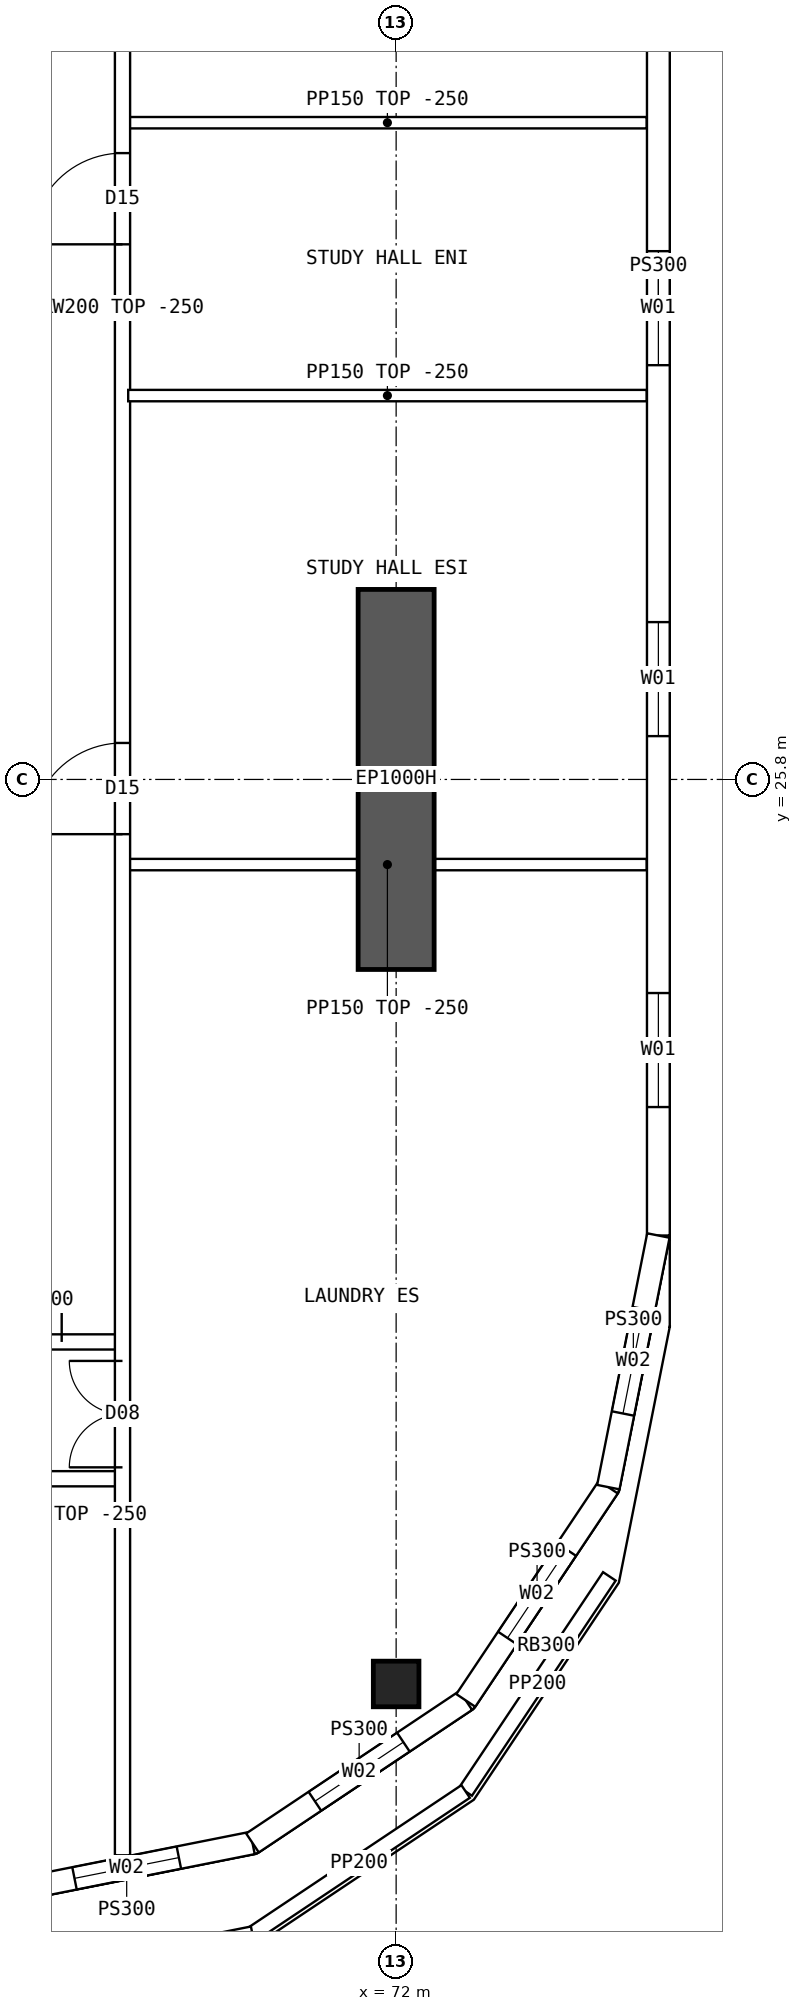
"""IFC4 building model, lengths in metres.
Left out: names, types, materials, properties, quantities, classifications, styles, units other than length and angle.
Written with IfcOpenShell. Run it as: python <this file> out.ifc"""

import sys

from ifc_helpers import new_model, si_unit, direction, frame, frame_2d, origin, origin_2d, place, context, subcontext, project, spatial, polyline, rectangle, hollow_rectangle, outline, extrude, element, fill, save


model = new_model("IFC4")
c1 = context("Model", 3, precision=1e-05, world=origin(), true_north=direction((0.0, 1.0)))
c2 = subcontext(c1, "Body", "Model", "MODEL_VIEW")
j1 = project(units=[si_unit("LENGTHUNIT", "METRE"), si_unit("PLANEANGLEUNIT", "RADIAN")], contexts=[c1])
p1 = place(None, origin())
s1 = spatial("IfcSite", under=j1, at=p1, CompositionType="ELEMENT")
p2 = place(p1, origin())
s2 = spatial("IfcBuilding", under=s1, at=p2, CompositionType="ELEMENT")
p3 = place(p2, frame((0.0, 0.0, 208.3)))
s3 = spatial("IfcBuildingStorey", under=s2, at=p3, CompositionType="ELEMENT", Elevation=208.3)
p4 = place(p3, frame((72.0, 13.9, 0.0), z_axis=(0.0, 0.0, 1.0), x_axis=(1.0, 0.0, 0.0)))
e1 = element("IfcColumn", 1, at=p4, inside=s3, PredefinedType="COLUMN", context=c2, shape_type="SweptSolid", body=[
    extrude(hollow_rectangle(XDim=0.6, YDim=0.6, WallThickness=0.06, at=origin_2d()), origin(), (0.0, 0.0, 1.0), 4.5),
])
p5 = place(p3, frame((72.0, 23.3, 0.0), z_axis=(0.0, 0.0, 1.0), x_axis=(0.0, 1.0, 0.0)))
e2 = element("IfcWall", 2, at=p5, inside=s3, PredefinedType="SHEAR", context=c2, shape_type="SweptSolid", body=[
    extrude(rectangle(XDim=5.0, YDim=1.0, at=frame_2d((2.5, 0.0))), origin(), (0.0, 0.0, 1.0), 4.5),
])
p6 = place(p3, frame((75.45, 19.8, 0.0), z_axis=(0.0, 0.0, 1.0), x_axis=(0.0, 1.0, 0.0)))
e3 = element("IfcWall", 3, at=p6, inside=s3, PredefinedType="SOLIDWALL", context=c2, shape_type="SweptSolid", body=[
    extrude(outline(polyline([(-0.015, -0.15), (24.415, -0.15), (24.385, 0.15), (0.015, 0.15), (-0.015, -0.15)])), origin(), (0.0, 0.0, 1.0), 4.25),
])
p7 = place(p6, frame((1.69, 0.0, 0.9)))
e4 = element("IfcOpeningElement", 4, at=p7, cuts=e3, PredefinedType="OPENING", context=c2, shape_type="SweptSolid", body=[
    extrude(rectangle(XDim=1.5, YDim=2.0, at=frame_2d((0.75, 1.0))), frame((0.0, 0.16, 0.0), z_axis=(0.0, -1.0, 0.0), x_axis=(1.0, 0.0, 0.0)), (0.0, 0.0, 1.0), 0.32),
])
p8 = place(p6, frame((6.57, 0.0, 0.9)))
e5 = element("IfcOpeningElement", 5, at=p8, cuts=e3, PredefinedType="OPENING", context=c2, shape_type="SweptSolid", body=[
    extrude(rectangle(XDim=1.5, YDim=2.0, at=frame_2d((0.75, 1.0))), frame((0.0, 0.16, 0.0), z_axis=(0.0, -1.0, 0.0), x_axis=(1.0, 0.0, 0.0)), (0.0, 0.0, 1.0), 0.32),
])
p9 = place(p6, frame((11.45, 0.0, 0.9)))
e6 = element("IfcOpeningElement", 6, at=p9, cuts=e3, PredefinedType="OPENING", context=c2, shape_type="SweptSolid", body=[
    extrude(rectangle(XDim=1.5, YDim=2.0, at=frame_2d((0.75, 1.0))), frame((0.0, 0.16, 0.0), z_axis=(0.0, -1.0, 0.0), x_axis=(1.0, 0.0, 0.0)), (0.0, 0.0, 1.0), 0.32),
])
p10 = place(p6, frame((16.33, 0.0, 0.9)))
e7 = element("IfcOpeningElement", 7, at=p10, cuts=e3, PredefinedType="OPENING", context=c2, shape_type="SweptSolid", body=[
    extrude(rectangle(XDim=1.5, YDim=2.0, at=frame_2d((0.75, 1.0))), frame((0.0, 0.16, 0.0), z_axis=(0.0, -1.0, 0.0), x_axis=(1.0, 0.0, 0.0)), (0.0, 0.0, 1.0), 0.32),
])
p11 = place(p6, frame((21.21, 0.0, 0.9)))
e8 = element("IfcOpeningElement", 8, at=p11, cuts=e3, PredefinedType="OPENING", context=c2, shape_type="SweptSolid", body=[
    extrude(rectangle(XDim=1.5, YDim=2.0, at=frame_2d((0.75, 1.0))), frame((0.0, 0.16, 0.0), z_axis=(0.0, -1.0, 0.0), x_axis=(1.0, 0.0, 0.0)), (0.0, 0.0, 1.0), 0.32),
])
p12 = place(p3, frame((66.8, 11.15, 0.0), z_axis=(0.0, 0.0, 1.0), x_axis=(0.98078325777, 0.195100490205, 0.0)))
e9 = element("IfcWall", 9, at=p12, inside=s3, PredefinedType="SOLIDWALL", context=c2, shape_type="SweptSolid", body=[
    extrude(outline(polyline([(-0.03, -0.15), (3.405, -0.15), (3.345, 0.15), (0.03, 0.15), (-0.03, -0.15)])), origin(), (0.0, 0.0, 1.0), 4.25),
])
p13 = place(p12, frame((0.988, 0.0, 0.9)))
e10 = element("IfcOpeningElement", 10, at=p13, cuts=e9, PredefinedType="OPENING", context=c2, shape_type="SweptSolid", body=[
    extrude(rectangle(XDim=1.4, YDim=1.8, at=frame_2d((0.7, 0.9))), frame((0.0, 0.16, 0.0), z_axis=(0.0, -1.0, 0.0), x_axis=(1.0, 0.0, 0.0)), (0.0, 0.0, 1.0), 0.32),
])
p14 = place(p3, frame((70.11, 11.808, 0.0), z_axis=(0.0, 0.0, 1.0), x_axis=(0.831460037396, 0.555584562613, 0.0)))
e11 = element("IfcWall", 11, at=p14, inside=s3, PredefinedType="SOLIDWALL", context=c2, shape_type="SweptSolid", body=[
    extrude(outline(polyline([(-0.03, -0.15), (3.405, -0.15), (3.345, 0.15), (0.03, 0.15), (-0.03, -0.15)])), origin(), (0.0, 0.0, 1.0), 4.25),
])
p15 = place(p14, frame((0.988, 0.0, 0.9)))
e12 = element("IfcOpeningElement", 12, at=p15, cuts=e11, PredefinedType="OPENING", context=c2, shape_type="SweptSolid", body=[
    extrude(rectangle(XDim=1.4, YDim=1.8, at=frame_2d((0.7, 0.9))), frame((0.0, 0.16, 0.0), z_axis=(0.0, -1.0, 0.0), x_axis=(1.0, 0.0, 0.0)), (0.0, 0.0, 1.0), 0.32),
])
p16 = place(p3, frame((72.917, 13.684, 0.0), z_axis=(0.0, 0.0, 1.0), x_axis=(0.555567969291, 0.831471124873, 0.0)))
e13 = element("IfcWall", 13, at=p16, inside=s3, PredefinedType="SOLIDWALL", context=c2, shape_type="SweptSolid", body=[
    extrude(outline(polyline([(-0.03, -0.15), (3.405, -0.15), (3.345, 0.15), (0.03, 0.15), (-0.03, -0.15)])), origin(), (0.0, 0.0, 1.0), 4.25),
])
p17 = place(p16, frame((0.988, 0.0, 0.9)))
e14 = element("IfcOpeningElement", 14, at=p17, cuts=e13, PredefinedType="OPENING", context=c2, shape_type="SweptSolid", body=[
    extrude(rectangle(XDim=1.4, YDim=1.8, at=frame_2d((0.7, 0.9))), frame((0.0, 0.16, 0.0), z_axis=(0.0, -1.0, 0.0), x_axis=(1.0, 0.0, 0.0)), (0.0, 0.0, 1.0), 0.32),
])
p18 = place(p3, frame((74.792, 16.49, 0.0), z_axis=(0.0, 0.0, 1.0), x_axis=(0.19508664885, 0.980786011034, 0.0)))
e15 = element("IfcWall", 15, at=p18, inside=s3, PredefinedType="SOLIDWALL", context=c2, shape_type="SweptSolid", body=[
    extrude(outline(polyline([(-0.03, -0.15), (3.39, -0.15), (3.36, 0.15), (0.03, 0.15), (-0.03, -0.15)])), origin(), (0.0, 0.0, 1.0), 4.25),
])
p19 = place(p18, frame((0.988, 0.0, 0.9)))
e16 = element("IfcOpeningElement", 16, at=p19, cuts=e15, PredefinedType="OPENING", context=c2, shape_type="SweptSolid", body=[
    extrude(rectangle(XDim=1.4, YDim=1.8, at=frame_2d((0.7, 0.9))), frame((0.0, 0.16, 0.0), z_axis=(0.0, -1.0, 0.0), x_axis=(1.0, 0.0, 0.0)), (0.0, 0.0, 1.0), 0.32),
])
p20 = place(p3, frame((74.805, 15.316, 0.0), z_axis=(0.0, 0.0, 1.0), x_axis=(-0.555593699073, -0.831453932308, 0.0)))
e17 = element("IfcWall", 17, at=p20, inside=s3, PredefinedType="PARAPET", context=c2, shape_type="SweptSolid", body=[
    extrude(rectangle(XDim=3.404, YDim=0.2, at=frame_2d((1.702, 0.0))), origin(), (0.0, 0.0, 1.0), 1.1),
])
p21 = place(p3, frame((72.914, 12.486, 0.0), z_axis=(0.0, 0.0, 1.0), x_axis=(-0.831448637767, -0.555601622348, 0.0)))
e18 = element("IfcWall", 18, at=p21, inside=s3, PredefinedType="PARAPET", context=c2, shape_type="SweptSolid", body=[
    extrude(rectangle(XDim=3.374, YDim=0.2, at=frame_2d((1.687, 0.0))), origin(), (0.0, 0.0, 1.0), 1.1),
])
p22 = place(p3, frame((70.109, 10.611, 0.0), z_axis=(0.0, 0.0, 1.0), x_axis=(-0.980787925163, -0.195077025438, 0.0)))
e19 = element("IfcWall", 19, at=p22, inside=s3, PredefinedType="PARAPET", context=c2, shape_type="SweptSolid", body=[
    extrude(rectangle(XDim=3.389, YDim=0.2, at=frame_2d((1.695, 0.0))), origin(), (0.0, 0.0, 1.0), 1.1),
])
p23 = place(p3, frame((66.35, 16.6, 0.0), z_axis=(0.0, 0.0, 1.0), x_axis=(1.0, 0.0, 0.0)))
e20 = element("IfcWall", 20, at=p23, inside=s3, PredefinedType="SOLIDWALL", context=c2, shape_type="SweptSolid", body=[
    extrude(rectangle(XDim=2.05, YDim=0.2, at=frame_2d((1.025, 0.0))), origin(), (0.0, 0.0, 1.0), 4.25),
])
p24 = place(p23, frame((0.2, 0.0, 0.0)))
e21 = element("IfcOpeningElement", 21, at=p24, cuts=e20, PredefinedType="OPENING", context=c2, shape_type="SweptSolid", body=[
    extrude(rectangle(XDim=0.9, YDim=2.1, at=frame_2d((0.45, 1.05))), frame((0.0, 0.11, 0.0), z_axis=(0.0, -1.0, 0.0), x_axis=(1.0, 0.0, 0.0)), (0.0, 0.0, 1.0), 0.22),
])
p25 = place(p3, frame((66.35, 18.4, 0.0), z_axis=(0.0, 0.0, 1.0), x_axis=(1.0, 0.0, 0.0)))
e22 = element("IfcWall", 22, at=p25, inside=s3, PredefinedType="SOLIDWALL", context=c2, shape_type="SweptSolid", body=[
    extrude(rectangle(XDim=2.05, YDim=0.2, at=frame_2d((1.025, 0.0))), origin(), (0.0, 0.0, 1.0), 4.25),
])
p26 = place(p25, frame((0.05, 0.0, 0.0)))
e23 = element("IfcOpeningElement", 23, at=p26, cuts=e22, PredefinedType="OPENING", context=c2, shape_type="SweptSolid", body=[
    extrude(rectangle(XDim=1.2, YDim=2.1, at=frame_2d((0.6, 1.05))), frame((0.0, 0.11, 0.0), z_axis=(0.0, -1.0, 0.0), x_axis=(1.0, 0.0, 0.0)), (0.0, 0.0, 1.0), 0.22),
])
p27 = place(p3, frame((68.475, 30.85, 0.0), z_axis=(0.0, 0.0, 1.0), x_axis=(1.0, 0.0, 0.0)))
e24 = element("IfcWall", 24, at=p27, inside=s3, PredefinedType="PARTITIONING", context=c2, shape_type="SweptSolid", body=[
    extrude(outline(polyline([(0.0, 0.0), (6.82, 0.0), (6.82, 4.25), (3.827, 4.25), (3.825, 3.8), (3.227, 3.8), (3.225, 4.25), (0.0, 4.25), (0.0, 0.0)])), frame((0.0, 0.075, 0.0), z_axis=(0.0, -1.0, 0.0), x_axis=(1.0, 0.0, 0.0)), (0.0, 0.0, 1.0), 0.15),
])
p28 = place(p3, frame((68.4, 11.646, 0.0), z_axis=(0.0, 0.0, 1.0), x_axis=(0.0, 1.0, 0.0)))
e25 = element("IfcWall", 25, at=p28, inside=s3, PredefinedType="SOLIDWALL", context=c2, shape_type="SweptSolid", body=[
    extrude(rectangle(XDim=40.708, YDim=0.2, at=frame_2d((20.354, 0.0))), origin(), (0.0, 0.0, 1.0), 4.25),
])
p29 = place(p28, frame((13.434, 0.0, 0.0)))
e26 = element("IfcOpeningElement", 26, at=p29, cuts=e25, PredefinedType="OPENING", context=c2, shape_type="SweptSolid", body=[
    extrude(rectangle(XDim=1.2, YDim=2.1, at=frame_2d((0.6, 1.05))), frame((0.0, 0.11, 0.0), z_axis=(0.0, -1.0, 0.0), x_axis=(1.0, 0.0, 0.0)), (0.0, 0.0, 1.0), 0.22),
])
p30 = place(p28, frame((21.194, 0.0, 0.0)))
e27 = element("IfcOpeningElement", 27, at=p30, cuts=e25, PredefinedType="OPENING", context=c2, shape_type="SweptSolid", body=[
    extrude(rectangle(XDim=1.2, YDim=2.1, at=frame_2d((0.6, 1.05))), frame((0.0, 0.11, 0.0), z_axis=(0.0, -1.0, 0.0), x_axis=(1.0, 0.0, 0.0)), (0.0, 0.0, 1.0), 0.22),
])
p31 = place(p28, frame((5.104, 0.0, 0.0)))
e28 = element("IfcOpeningElement", 28, at=p31, cuts=e25, PredefinedType="OPENING", context=c2, shape_type="SweptSolid", body=[
    extrude(rectangle(XDim=1.4, YDim=2.1, at=frame_2d((0.7, 1.05))), frame((0.0, 0.11, 0.0), z_axis=(0.0, -1.0, 0.0), x_axis=(1.0, 0.0, 0.0)), (0.0, 0.0, 1.0), 0.22),
])
p32 = place(p28, frame((34.104, 0.0, 0.0)))
e29 = element("IfcOpeningElement", 29, at=p32, cuts=e25, PredefinedType="OPENING", context=c2, shape_type="SweptSolid", body=[
    extrude(rectangle(XDim=1.4, YDim=2.1, at=frame_2d((0.7, 1.05))), frame((0.0, 0.11, 0.0), z_axis=(0.0, -1.0, 0.0), x_axis=(1.0, 0.0, 0.0)), (0.0, 0.0, 1.0), 0.22),
])
p33 = place(p3, frame((68.475, 24.68, 0.0), z_axis=(0.0, 0.0, 1.0), x_axis=(1.0, 0.0, 0.0)))
e30 = element("IfcWall", 30, at=p33, inside=s3, PredefinedType="PARTITIONING", context=c2, shape_type="SweptSolid", body=[
    extrude(rectangle(XDim=6.82, YDim=0.15, at=frame_2d((3.41, 0.0))), origin(), (0.0, 0.0, 1.0), 4.25),
])
p34 = place(p3, frame((68.475, 34.44, 0.0), z_axis=(0.0, 0.0, 1.0), x_axis=(1.0, 0.0, 0.0)))
e31 = element("IfcWall", 31, at=p34, inside=s3, PredefinedType="PARTITIONING", context=c2, shape_type="SweptSolid", body=[
    extrude(outline(polyline([(0.0, 0.0), (6.82, 0.0), (6.82, 4.25), (3.827, 4.25), (3.825, 3.8), (3.227, 3.8), (3.225, 4.25), (0.0, 4.25), (0.0, 0.0)])), frame((0.0, 0.075, 0.0), z_axis=(0.0, -1.0, 0.0), x_axis=(1.0, 0.0, 0.0)), (0.0, 0.0, 1.0), 0.15),
])
p35 = place(p7, origin())
e32 = element("IfcWindow", 32, at=p35, inside=s3, PartitioningType="SINGLE_PANEL", PredefinedType="WINDOW", context=c2, shape_type="SweptSolid", body=[
    extrude(rectangle(XDim=1.5, YDim=2.0, at=frame_2d((0.75, 1.0))), frame((0.0, 0.03, 0.0), z_axis=(0.0, -1.0, 0.0), x_axis=(1.0, 0.0, 0.0)), (0.0, 0.0, 1.0), 0.06),
])
fill(e4, e32)
p36 = place(p8, origin())
e33 = element("IfcWindow", 33, at=p36, inside=s3, PartitioningType="SINGLE_PANEL", PredefinedType="WINDOW", context=c2, shape_type="SweptSolid", body=[
    extrude(rectangle(XDim=1.5, YDim=2.0, at=frame_2d((0.75, 1.0))), frame((0.0, 0.03, 0.0), z_axis=(0.0, -1.0, 0.0), x_axis=(1.0, 0.0, 0.0)), (0.0, 0.0, 1.0), 0.06),
])
fill(e5, e33)
p37 = place(p9, origin())
e34 = element("IfcWindow", 34, at=p37, inside=s3, PartitioningType="SINGLE_PANEL", PredefinedType="WINDOW", context=c2, shape_type="SweptSolid", body=[
    extrude(rectangle(XDim=1.5, YDim=2.0, at=frame_2d((0.75, 1.0))), frame((0.0, 0.03, 0.0), z_axis=(0.0, -1.0, 0.0), x_axis=(1.0, 0.0, 0.0)), (0.0, 0.0, 1.0), 0.06),
])
fill(e6, e34)
p38 = place(p13, origin())
e35 = element("IfcWindow", 35, at=p38, inside=s3, PartitioningType="SINGLE_PANEL", PredefinedType="WINDOW", context=c2, shape_type="SweptSolid", body=[
    extrude(rectangle(XDim=1.4, YDim=1.8, at=frame_2d((0.7, 0.9))), frame((0.0, 0.03, 0.0), z_axis=(0.0, -1.0, 0.0), x_axis=(1.0, 0.0, 0.0)), (0.0, 0.0, 1.0), 0.06),
])
fill(e10, e35)
p39 = place(p15, origin())
e36 = element("IfcWindow", 36, at=p39, inside=s3, PartitioningType="SINGLE_PANEL", PredefinedType="WINDOW", context=c2, shape_type="SweptSolid", body=[
    extrude(rectangle(XDim=1.4, YDim=1.8, at=frame_2d((0.7, 0.9))), frame((0.0, 0.03, 0.0), z_axis=(0.0, -1.0, 0.0), x_axis=(1.0, 0.0, 0.0)), (0.0, 0.0, 1.0), 0.06),
])
fill(e12, e36)
p40 = place(p17, origin())
e37 = element("IfcWindow", 37, at=p40, inside=s3, PartitioningType="SINGLE_PANEL", PredefinedType="WINDOW", context=c2, shape_type="SweptSolid", body=[
    extrude(rectangle(XDim=1.4, YDim=1.8, at=frame_2d((0.7, 0.9))), frame((0.0, 0.03, 0.0), z_axis=(0.0, -1.0, 0.0), x_axis=(1.0, 0.0, 0.0)), (0.0, 0.0, 1.0), 0.06),
])
fill(e14, e37)
p41 = place(p19, origin())
e38 = element("IfcWindow", 38, at=p41, inside=s3, PartitioningType="SINGLE_PANEL", PredefinedType="WINDOW", context=c2, shape_type="SweptSolid", body=[
    extrude(rectangle(XDim=1.4, YDim=1.8, at=frame_2d((0.7, 0.9))), frame((0.0, 0.03, 0.0), z_axis=(0.0, -1.0, 0.0), x_axis=(1.0, 0.0, 0.0)), (0.0, 0.0, 1.0), 0.06),
])
fill(e16, e38)
p42 = place(p26, origin())
e39 = element("IfcDoor", 39, at=p42, inside=s3, OperationType="DOUBLE_DOOR_SINGLE_SWING", PredefinedType="DOOR", context=c2, shape_type="SweptSolid", body=[
    extrude(rectangle(XDim=1.2, YDim=2.1, at=frame_2d((0.6, 1.05))), frame((0.0, 0.025, 0.0), z_axis=(0.0, -1.0, 0.0), x_axis=(1.0, 0.0, 0.0)), (0.0, 0.0, 1.0), 0.05),
])
fill(e23, e39)
p43 = place(p29, origin())
e40 = element("IfcDoor", 40, at=p43, inside=s3, OperationType="SINGLE_SWING_LEFT", PredefinedType="DOOR", context=c2, shape_type="SweptSolid", body=[
    extrude(rectangle(XDim=1.2, YDim=2.1, at=frame_2d((0.6, 1.05))), frame((0.0, 0.025, 0.0), z_axis=(0.0, -1.0, 0.0), x_axis=(1.0, 0.0, 0.0)), (0.0, 0.0, 1.0), 0.05),
])
fill(e26, e40)
p44 = place(p30, origin())
e41 = element("IfcDoor", 41, at=p44, inside=s3, OperationType="SINGLE_SWING_LEFT", PredefinedType="DOOR", context=c2, shape_type="SweptSolid", body=[
    extrude(rectangle(XDim=1.2, YDim=2.1, at=frame_2d((0.6, 1.05))), frame((0.0, 0.025, 0.0), z_axis=(0.0, -1.0, 0.0), x_axis=(1.0, 0.0, 0.0)), (0.0, 0.0, 1.0), 0.05),
])
fill(e27, e41)
p45 = place(p31, origin())
e42 = element("IfcDoor", 42, at=p45, inside=s3, OperationType="DOUBLE_DOOR_SINGLE_SWING", PredefinedType="DOOR", context=c2, shape_type="SweptSolid", body=[
    extrude(rectangle(XDim=1.4, YDim=2.1, at=frame_2d((0.7, 1.05))), frame((0.0, 0.025, 0.0), z_axis=(0.0, -1.0, 0.0), x_axis=(1.0, 0.0, 0.0)), (0.0, 0.0, 1.0), 0.05),
])
fill(e28, e42)
save(model, sys.argv[1])
